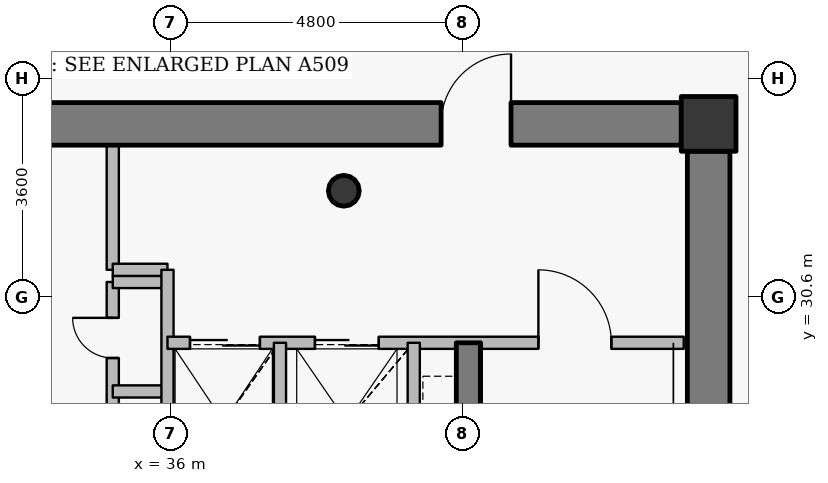
"""IFC4 building model, lengths in metres.
Left out: names, types, materials, properties, quantities, classifications, styles, units other than length and angle.
Written with IfcOpenShell. Run it as: python <this file> out.ifc"""

import sys

from ifc_helpers import new_model, si_unit, direction, frame, frame_2d, origin, origin_2d, place, context, subcontext, project, spatial, rectangle, hollow_circle, extrude, source, transform, mapped, element, fill, save


model = new_model("IFC4")
c1 = context("Model", 3, precision=1e-05, world=origin(), true_north=direction((0.0, 1.0)))
c2 = subcontext(c1, "Body", "Model", "MODEL_VIEW")
j1 = project(units=[si_unit("LENGTHUNIT", "METRE"), si_unit("PLANEANGLEUNIT", "RADIAN")], contexts=[c1])
p1 = place(None, origin())
s1 = spatial("IfcSite", under=j1, at=p1, CompositionType="ELEMENT")
p2 = place(p1, origin())
s2 = spatial("IfcBuilding", under=s1, at=p2, CompositionType="ELEMENT")
p3 = place(p2, frame((0.0, 0.0, 359.4)))
s3 = spatial("IfcBuildingStorey", under=s2, at=p3, CompositionType="ELEMENT", Elevation=359.4)
p4 = place(p3, frame((44.85, 33.45, 0.0), z_axis=(0.0, 0.0, 1.0), x_axis=(1.0, 0.0, 0.0)))
e1 = element("IfcColumn", 1, at=p4, inside=s3, PredefinedType="COLUMN", context=c2, shape_type="SweptSolid", body=[
    extrude(rectangle(XDim=0.9, YDim=0.9, at=origin_2d()), origin(), (0.0, 0.0, 1.0), 4.2),
])
p5 = place(p3, frame((38.85, 32.35, 0.0), z_axis=(0.0, 0.0, 1.0), x_axis=(1.0, 0.0, 0.0)))
e2 = element("IfcColumn", 2, at=p5, inside=s3, PredefinedType="COLUMN", context=c2, shape_type="SweptSolid", body=[
    extrude(hollow_circle(Radius=0.254, WallThickness=0.02, at=origin_2d()), origin(), (0.0, 0.0, 1.0), 4.2),
])
p6 = place(p3, frame((27.6, 33.45, 0.0), z_axis=(0.0, 0.0, 1.0), x_axis=(1.0, 0.0, 0.0)))
e3 = element("IfcWall", 3, at=p6, inside=s3, PredefinedType="SHEAR", context=c2, shape_type="SweptSolid", body=[
    extrude(rectangle(XDim=16.8, YDim=0.7, at=frame_2d((8.4, 0.0))), origin(), (0.0, 0.0, 1.0), 3.45),
])
p7 = place(p6, frame((12.85, 0.0, 0.0)))
e4 = element("IfcOpeningElement", 4, at=p7, cuts=e3, PredefinedType="OPENING", context=c2, shape_type="SweptSolid", body=[
    extrude(rectangle(XDim=1.15, YDim=2.15, at=origin_2d()), frame((0.575, 0.36, 1.075), z_axis=(0.0, -1.0, 0.0), x_axis=(1.0, 0.0, 0.0)), (0.0, 0.0, 1.0), 0.72),
])
p8 = place(p3, frame((44.85, 33.0, 0.0), z_axis=(0.0, 0.0, 1.0), x_axis=(0.0, -1.0, 0.0)))
e5 = element("IfcWall", 5, at=p8, inside=s3, PredefinedType="SHEAR", context=c2, shape_type="SweptSolid", body=[
    extrude(rectangle(XDim=12.0, YDim=0.7, at=frame_2d((6.0, 0.0))), origin(), (0.0, 0.0, 1.0), 3.45),
])
p9 = place(p3, frame((40.9, 27.25, 0.0), z_axis=(0.0, 0.0, 1.0), x_axis=(0.0, 1.0, 0.0)))
e6 = element("IfcWall", 6, at=p9, inside=s3, PredefinedType="SHEAR", context=c2, shape_type="SweptSolid", body=[
    extrude(rectangle(XDim=2.6, YDim=0.4, at=frame_2d((1.3, 0.0))), origin(), (0.0, 0.0, 1.0), 3.5),
])
p10 = place(p3, frame((35.05, 27.25, 0.0), z_axis=(0.0, 0.0, 1.0), x_axis=(0.0, 1.0, 0.0)))
e7 = element("IfcWall", 7, at=p10, inside=s3, PredefinedType="PARTITIONING", context=c2, shape_type="SweptSolid", body=[
    extrude(rectangle(XDim=3.6, YDim=0.2, at=frame_2d((1.8, 0.0))), origin(), (0.0, 0.0, 1.0), 3.9),
])
p11 = place(p10, frame((0.59, 0.0, 0.0)))
e8 = element("IfcOpeningElement", 8, at=p11, cuts=e7, PredefinedType="OPENING", context=c2, shape_type="SweptSolid", body=[
    extrude(rectangle(XDim=0.66, YDim=2.05, at=origin_2d()), frame((0.33, 0.11, 1.025), z_axis=(0.0, -1.0, 0.0), x_axis=(1.0, 0.0, 0.0)), (0.0, 0.0, 1.0), 0.22),
])
p12 = place(p10, frame((2.35, 0.0, 0.0)))
e9 = element("IfcOpeningElement", 9, at=p12, cuts=e7, PredefinedType="OPENING", context=c2, shape_type="SweptSolid", body=[
    extrude(rectangle(XDim=0.66, YDim=2.05, at=origin_2d()), frame((0.33, 0.11, 1.025), z_axis=(0.0, -1.0, 0.0), x_axis=(1.0, 0.0, 0.0)), (0.0, 0.0, 1.0), 0.22),
])
for number, where, z_axis, x_axis in (
    (10, (35.05, 29.05, 0.0), (0.0, 0.0, 1.0), (1.0, 0.0, 0.0)),
    (11, (35.05, 30.85, 0.0), (0.0, 0.0, 1.0), (1.0, 0.0, 0.0)),
):
    element("IfcWall", number, at=place(p3, frame(where, z_axis=z_axis, x_axis=x_axis)), inside=s3, PredefinedType="PARTITIONING", context=c2, shape_type="SweptSolid", body=[
        extrude(rectangle(XDim=0.9, YDim=0.2, at=frame_2d((0.45, 0.0))), origin(), (0.0, 0.0, 1.0), 3.9),
    ])
p13 = place(p3, frame((35.05, 31.05, 0.0), z_axis=(0.0, 0.0, 1.0), x_axis=(0.0, 1.0, 0.0)))
e12 = element("IfcWall", 12, at=p13, inside=s3, PredefinedType="PARTITIONING", context=c2, shape_type="SweptSolid", body=[
    extrude(rectangle(XDim=2.05, YDim=0.2, at=frame_2d((1.025, 0.0))), origin(), (0.0, 0.0, 1.0), 3.485),
])
p14 = place(p3, frame((35.05, 31.05, 0.0), z_axis=(0.0, 0.0, 1.0), x_axis=(1.0, 0.0, 0.0)))
e13 = element("IfcWall", 13, at=p14, inside=s3, PredefinedType="PARTITIONING", context=c2, shape_type="SweptSolid", body=[
    extrude(rectangle(XDim=0.9, YDim=0.2, at=frame_2d((0.45, 0.0))), origin(), (0.0, 0.0, 1.0), 3.9),
])
p15 = place(p3, frame((35.95, 27.25, 0.0), z_axis=(0.0, 0.0, 1.0), x_axis=(0.0, 1.0, 0.0)))
e14 = element("IfcWall", 14, at=p15, inside=s3, PredefinedType="PARTITIONING", context=c2, shape_type="SweptSolid", body=[
    extrude(rectangle(XDim=3.8, YDim=0.2, at=frame_2d((1.9, 0.0))), origin(), (0.0, 0.0, 1.0), 3.9),
])
p16 = place(p3, frame((35.95, 29.85, 0.0), z_axis=(0.0, 0.0, 1.0), x_axis=(1.0, 0.0, 0.0)))
e15 = element("IfcWall", 15, at=p16, inside=s3, PredefinedType="PARTITIONING", context=c2, shape_type="SweptSolid", body=[
    extrude(rectangle(XDim=8.49, YDim=0.2, at=frame_2d((4.245, 0.0))), origin(), (0.0, 0.0, 1.0), 3.485),
])
p17 = place(p16, frame((6.1, 0.0, 0.0)))
e16 = element("IfcOpeningElement", 16, at=p17, cuts=e15, PredefinedType="OPENING", context=c2, shape_type="SweptSolid", body=[
    extrude(rectangle(XDim=1.2, YDim=2.15, at=origin_2d()), frame((0.6, 0.11, 1.075), z_axis=(0.0, -1.0, 0.0), x_axis=(1.0, 0.0, 0.0)), (0.0, 0.0, 1.0), 0.22),
])
p18 = place(p16, frame((0.37, 0.0, 0.0)))
e17 = element("IfcOpeningElement", 17, at=p18, cuts=e15, PredefinedType="OPENING", context=c2, shape_type="SweptSolid", body=[
    extrude(rectangle(XDim=1.15, YDim=2.15, at=origin_2d()), frame((0.575, 0.11, 1.075), z_axis=(0.0, -1.0, 0.0), x_axis=(1.0, 0.0, 0.0)), (0.0, 0.0, 1.0), 0.22),
])
p19 = place(p16, frame((2.425, 0.0, 0.0)))
e18 = element("IfcOpeningElement", 18, at=p19, cuts=e15, PredefinedType="OPENING", context=c2, shape_type="SweptSolid", body=[
    extrude(rectangle(XDim=1.05, YDim=2.15, at=origin_2d()), frame((0.525, 0.11, 1.075), z_axis=(0.0, -1.0, 0.0), x_axis=(1.0, 0.0, 0.0)), (0.0, 0.0, 1.0), 0.22),
])
p20 = place(p3, frame((37.8, 27.25, 0.0), z_axis=(0.0, 0.0, 1.0), x_axis=(0.0, 1.0, 0.0)))
e19 = element("IfcWall", 19, at=p20, inside=s3, PredefinedType="PARTITIONING", context=c2, shape_type="SweptSolid", body=[
    extrude(rectangle(XDim=2.6, YDim=0.2, at=frame_2d((1.3, 0.0))), origin(), (0.0, 0.0, 1.0), 3.9),
])
p21 = place(p3, frame((40.0, 25.45, 0.0), z_axis=(0.0, 0.0, 1.0), x_axis=(0.0, 1.0, 0.0)))
e20 = element("IfcWall", 20, at=p21, inside=s3, PredefinedType="PARTITIONING", context=c2, shape_type="SweptSolid", body=[
    extrude(rectangle(XDim=4.4, YDim=0.2, at=frame_2d((2.2, 0.0))), origin(), (0.0, 0.0, 1.0), 3.9),
])
p22 = place(p3, frame((45.2, 33.8, 0.0), z_axis=(0.0, 0.0, 1.0), x_axis=(-1.0, 0.0, 0.0)))
e21 = element("IfcWall", 21, at=p22, inside=s3, PredefinedType="PARTITIONING", context=c2, shape_type="SweptSolid", body=[
    extrude(rectangle(XDim=0.79, YDim=0.135, at=frame_2d((0.395, 0.0))), origin(), (0.0, 0.0, 1.0), 2.685),
])
p23 = place(p3, frame((45.2, 33.01, 0.0), z_axis=(0.0, 0.0, 1.0), x_axis=(0.0, 1.0, 0.0)))
e22 = element("IfcWall", 22, at=p23, inside=s3, PredefinedType="PARTITIONING", context=c2, shape_type="SweptSolid", body=[
    extrude(rectangle(XDim=0.482, YDim=0.135, at=frame_2d((0.241, 0.0))), origin(), (0.0, 0.0, 1.0), 3.9),
])
m1 = source(origin(), c2, "Body", "SweptSolid", [
    extrude(rectangle(XDim=1.15, YDim=2.15, at=origin_2d()), frame((0.575, 0.025, 1.075), z_axis=(0.0, -1.0, 0.0), x_axis=(1.0, 0.0, 0.0)), (0.0, 0.0, 1.0), 0.05),
])
p24 = place(p7, origin())
e23 = element("IfcDoor", 23, at=p24, inside=s3, OperationType="SINGLE_SWING_RIGHT", PredefinedType="DOOR", context=c2, shape_type="MappedRepresentation", body=[
    mapped(m1, transform((0.0, 0.0, 0.0), x_axis=(1.0, 0.0, 0.0), y_axis=(0.0, 1.0, 0.0), z_axis=(0.0, 0.0, 1.0), scale=1.0)),
])
fill(e4, e23)
m2 = source(origin(), c2, "Body", "SweptSolid", [
    extrude(rectangle(XDim=1.2, YDim=2.15, at=origin_2d()), frame((0.6, 0.025, 1.075), z_axis=(0.0, -1.0, 0.0), x_axis=(1.0, 0.0, 0.0)), (0.0, 0.0, 1.0), 0.05),
])
p25 = place(p17, origin())
e24 = element("IfcDoor", 24, at=p25, inside=s3, OperationType="SINGLE_SWING_LEFT", PredefinedType="DOOR", context=c2, shape_type="MappedRepresentation", body=[
    mapped(m2, transform((0.0, 0.0, 0.0), x_axis=(1.0, 0.0, 0.0), y_axis=(0.0, 1.0, 0.0), z_axis=(0.0, 0.0, 1.0), scale=1.0)),
])
fill(e16, e24)
m3 = source(origin(), c2, "Body", "SweptSolid", [
    extrude(rectangle(XDim=1.15, YDim=2.15, at=origin_2d()), frame((0.575, 0.025, 1.075), z_axis=(0.0, -1.0, 0.0), x_axis=(1.0, 0.0, 0.0)), (0.0, 0.0, 1.0), 0.05),
])
p26 = place(p18, origin())
e25 = element("IfcDoor", 25, at=p26, inside=s3, OperationType="DOUBLE_DOOR_SLIDING", PredefinedType="USERDEFINED", context=c2, shape_type="MappedRepresentation", body=[
    mapped(m3, transform((0.0, 0.0, 0.0), x_axis=(1.0, 0.0, 0.0), y_axis=(0.0, 1.0, 0.0), z_axis=(0.0, 0.0, 1.0), scale=1.0)),
])
fill(e17, e25)
m4 = source(origin(), c2, "Body", "SweptSolid", [
    extrude(rectangle(XDim=1.05, YDim=2.15, at=origin_2d()), frame((0.525, 0.025, 1.075), z_axis=(0.0, -1.0, 0.0), x_axis=(1.0, 0.0, 0.0)), (0.0, 0.0, 1.0), 0.05),
])
p27 = place(p19, origin())
e26 = element("IfcDoor", 26, at=p27, inside=s3, OperationType="DOUBLE_DOOR_SLIDING", PredefinedType="USERDEFINED", context=c2, shape_type="MappedRepresentation", body=[
    mapped(m4, transform((0.0, 0.0, 0.0), x_axis=(1.0, 0.0, 0.0), y_axis=(0.0, 1.0, 0.0), z_axis=(0.0, 0.0, 1.0), scale=1.0)),
])
fill(e18, e26)
m5 = source(origin(), c2, "Body", "SweptSolid", [
    extrude(rectangle(XDim=0.66, YDim=2.05, at=origin_2d()), frame((0.33, 0.025, 1.025), z_axis=(0.0, -1.0, 0.0), x_axis=(1.0, 0.0, 0.0)), (0.0, 0.0, 1.0), 0.05),
])
p28 = place(p12, origin())
e27 = element("IfcDoor", 27, at=p28, inside=s3, OperationType="SINGLE_SWING_RIGHT", PredefinedType="USERDEFINED", context=c2, shape_type="MappedRepresentation", body=[
    mapped(m5, transform((0.0, 0.0, 0.0), x_axis=(1.0, 0.0, 0.0), y_axis=(0.0, 1.0, 0.0), z_axis=(0.0, 0.0, 1.0), scale=1.0)),
])
fill(e9, e27)
save(model, sys.argv[1])
